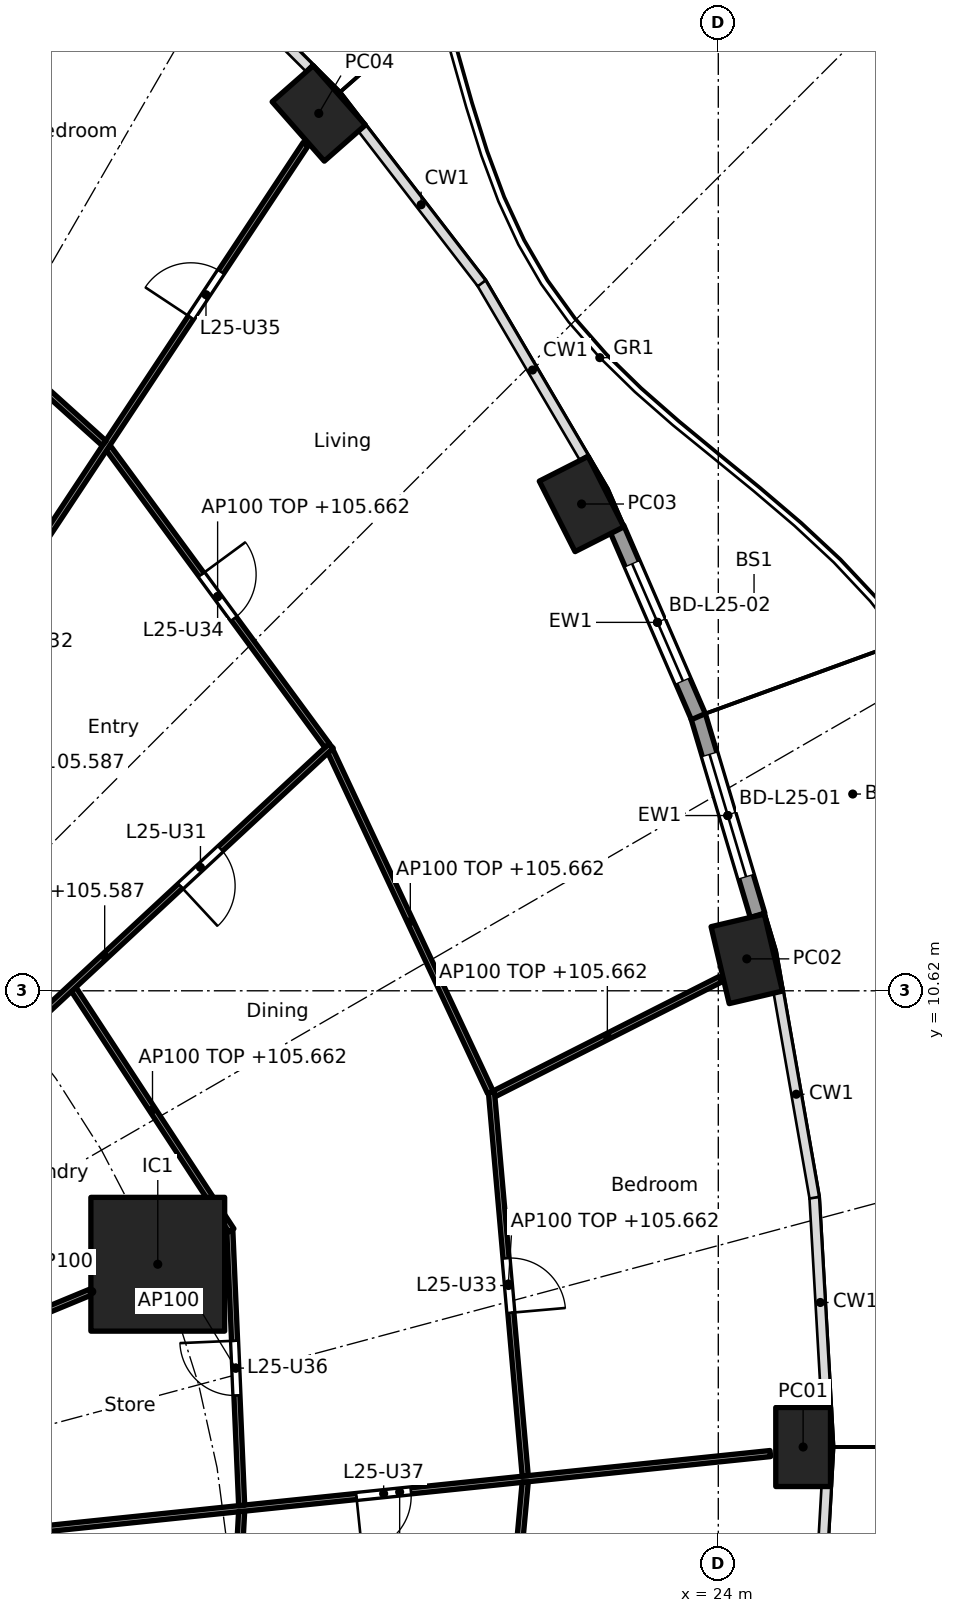
"""IFC4 building model, lengths in metres.
Left out: names, types, materials, properties, quantities, classifications, styles, units other than length and angle.
Written with IfcOpenShell. Run it as: python <this file> out.ifc"""

import sys

from ifc_helpers import new_model, si_unit, direction, frame, frame_2d, origin, origin_2d, place, context, subcontext, project, spatial, rectangle, hollow_rectangle, extrude, element, fill, save


model = new_model("IFC4")
c1 = context("Model", 3, precision=1e-05, world=origin(), true_north=direction((0.0, 1.0)))
c2 = subcontext(c1, "Body", "Model", "MODEL_VIEW")
j1 = project(units=[si_unit("LENGTHUNIT", "METRE"), si_unit("PLANEANGLEUNIT", "RADIAN")], contexts=[c1])
p1 = place(None, origin())
s1 = spatial("IfcSite", under=j1, at=p1, CompositionType="ELEMENT")
p2 = place(p1, origin())
s2 = spatial("IfcBuilding", under=s1, at=p2, CompositionType="ELEMENT")
p3 = place(p2, frame((0.0, 0.0, 102.9)))
s3 = spatial("IfcBuildingStorey", under=s2, at=p3, CompositionType="ELEMENT", Elevation=102.9)
for number, where, z_axis, x_axis in (
    (1, (25.395, 3.118, 0.0), (0.0, 0.0, 1.0), (0.0, 1.0, 0.0)),
    (2, (24.468, 11.145, 0.0), (0.0, 0.0, 1.0), (-0.229, 0.973, 0.0)),
    (3, (21.751, 18.625, 0.0), (0.0, 0.0, 1.0), (-0.452, 0.892, 0.0)),
    (4, (17.43, 25.049, 0.0), (0.0, 0.0, 1.0), (-0.66, 0.751, 0.0)),
):
    element("IfcColumn", number, at=place(p3, frame(where, z_axis=z_axis, x_axis=x_axis)), inside=s3, PredefinedType="COLUMN", context=c2, shape_type="SweptSolid", body=[
        extrude(hollow_rectangle(XDim=1.3, YDim=0.9, WallThickness=0.045, at=origin_2d()), origin(), (0.0, 0.0, 1.0), 3.7),
    ])
p4 = place(p3, frame((14.782, 6.123, 0.0), z_axis=(0.0, 0.0, 1.0), x_axis=(1.0, 0.0, 0.0)))
e5 = element("IfcColumn", 5, at=p4, inside=s3, PredefinedType="COLUMN", context=c2, shape_type="SweptSolid", body=[
    extrude(rectangle(XDim=2.2, YDim=2.2, at=origin_2d()), origin(), (0.0, 0.0, 1.0), 3.7),
])
p5 = place(p3, frame((23.667, 15.142, 0.0), z_axis=(0.0, 0.0, 1.0), x_axis=(0.285882094477, -0.958264800594, 0.0)))
e6 = element("IfcWall", 6, at=p5, inside=s3, PredefinedType="SOLIDWALL", context=c2, shape_type="SweptSolid", body=[
    extrude(rectangle(XDim=3.424, YDim=0.25, at=frame_2d((1.712, 0.0))), origin(), (0.0, 0.0, 1.0), 3.44),
])
p6 = place(p5, frame((0.662, 0.0, 0.0)))
e7 = element("IfcOpeningElement", 7, at=p6, cuts=e6, PredefinedType="OPENING", context=c2, shape_type="SweptSolid", body=[
    extrude(rectangle(XDim=2.1, YDim=2.4, at=frame_2d((1.05, 1.2))), frame((0.0, 0.135, 0.0), z_axis=(0.0, -1.0, 0.0), x_axis=(1.0, 0.0, 0.0)), (0.0, 0.0, 1.0), 0.27),
])
p7 = place(p3, frame((22.328, 18.229, 0.0), z_axis=(0.0, 0.0, 1.0), x_axis=(0.397621629246, -0.917549475481, 0.0)))
e8 = element("IfcWall", 8, at=p7, inside=s3, PredefinedType="SOLIDWALL", context=c2, shape_type="SweptSolid", body=[
    extrude(rectangle(XDim=3.379, YDim=0.25, at=frame_2d((1.69, 0.0))), origin(), (0.0, 0.0, 1.0), 3.44),
])
p8 = place(p7, frame((0.64, 0.0, 0.0)))
e9 = element("IfcOpeningElement", 9, at=p8, cuts=e8, PredefinedType="OPENING", context=c2, shape_type="SweptSolid", body=[
    extrude(rectangle(XDim=2.1, YDim=2.4, at=frame_2d((1.05, 1.2))), frame((0.0, 0.135, 0.0), z_axis=(0.0, -1.0, 0.0), x_axis=(1.0, 0.0, 0.0)), (0.0, 0.0, 1.0), 0.27),
])
p9 = place(p3, frame((12.664, 1.745, 0.0), z_axis=(0.0, 0.0, 1.0), x_axis=(0.994662790212, 0.103179134358, 0.0)))
e10 = element("IfcWall", 10, at=p9, inside=s3, PredefinedType="PARTITIONING", context=c2, shape_type="SweptSolid", body=[
    extrude(rectangle(XDim=12.257, YDim=0.1, at=frame_2d((6.128, 0.0))), origin(), (0.0, 0.0, 1.0), 2.687),
])
p10 = place(p9, frame((5.414, 0.0, 0.0)))
e11 = element("IfcOpeningElement", 11, at=p10, cuts=e10, PredefinedType="OPENING", context=c2, shape_type="SweptSolid", body=[
    extrude(rectangle(XDim=0.9, YDim=2.1, at=frame_2d((0.45, 1.05))), frame((0.0, 0.06, 0.0), z_axis=(0.0, -1.0, 0.0), x_axis=(1.0, 0.0, 0.0)), (0.0, 0.0, 1.0), 0.12),
])
p11 = place(p3, frame((16.162, 2.158, 0.0), z_axis=(0.0, 0.0, 1.0), x_axis=(-0.043120653248, 0.999069872063, 0.0)))
e12 = element("IfcWall", 12, at=p11, inside=s3, PredefinedType="PARTITIONING", context=c2, shape_type="SweptSolid", body=[
    extrude(rectangle(XDim=4.518, YDim=0.1, at=frame_2d((2.259, 0.0))), origin(), (0.0, 0.0, 1.0), 3.44),
])
p12 = place(p11, frame((1.809, 0.0, 0.0)))
e13 = element("IfcOpeningElement", 13, at=p12, cuts=e12, PredefinedType="OPENING", context=c2, shape_type="SweptSolid", body=[
    extrude(rectangle(XDim=0.9, YDim=2.1, at=frame_2d((0.45, 1.05))), frame((0.0, 0.06, 0.0), z_axis=(0.0, -1.0, 0.0), x_axis=(1.0, 0.0, 0.0)), (0.0, 0.0, 1.0), 0.12),
])
p13 = place(p3, frame((16.161, 2.058, 0.0), z_axis=(0.0, 0.0, 1.0), x_axis=(-0.053696394729, -0.998557307916, 0.0)))
e14 = element("IfcWall", 14, at=p13, inside=s3, PredefinedType="PARTITIONING", context=c2, shape_type="SweptSolid", body=[
    extrude(rectangle(XDim=4.742, YDim=0.1, at=frame_2d((2.371, 0.0))), origin(), (0.0, 0.0, 1.0), 2.762),
])
p14 = place(p13, frame((1.896, 0.0, 0.0)))
e15 = element("IfcOpeningElement", 15, at=p14, cuts=e14, PredefinedType="OPENING", context=c2, shape_type="SweptSolid", body=[
    extrude(rectangle(XDim=0.9, YDim=2.1, at=frame_2d((0.45, 1.05))), frame((0.0, 0.06, 0.0), z_axis=(0.0, -1.0, 0.0), x_axis=(1.0, 0.0, 0.0)), (0.0, 0.0, 1.0), 0.12),
])
p15 = place(p3, frame((20.825, 2.642, 0.0), z_axis=(0.0, 0.0, 1.0), x_axis=(-0.08776338161, 0.996141349834, 0.0)))
e16 = element("IfcWall", 16, at=p15, inside=s3, PredefinedType="PARTITIONING", context=c2, shape_type="SweptSolid", body=[
    extrude(rectangle(XDim=6.337, YDim=0.1, at=frame_2d((3.168, 0.0))), origin(), (0.0, 0.0, 1.0), 2.762),
])
p16 = place(p15, frame((2.694, 0.0, 0.0)))
e17 = element("IfcOpeningElement", 17, at=p16, cuts=e16, PredefinedType="OPENING", context=c2, shape_type="SweptSolid", body=[
    extrude(rectangle(XDim=0.9, YDim=2.1, at=frame_2d((0.45, 1.05))), frame((0.0, 0.06, 0.0), z_axis=(0.0, -1.0, 0.0), x_axis=(1.0, 0.0, 0.0)), (0.0, 0.0, 1.0), 0.12),
])
p17 = place(p3, frame((20.825, 2.542, 0.0), z_axis=(0.0, 0.0, 1.0), x_axis=(-0.09140211812, -0.995814065377, 0.0)))
e18 = element("IfcWall", 18, at=p17, inside=s3, PredefinedType="PARTITIONING", context=c2, shape_type="SweptSolid", body=[
    extrude(rectangle(XDim=6.403, YDim=0.1, at=frame_2d((3.201, 0.0))), origin(), (0.0, 0.0, 1.0), 2.762),
])
p18 = place(p17, frame((2.726, 0.0, 0.0)))
e19 = element("IfcOpeningElement", 19, at=p18, cuts=e18, PredefinedType="OPENING", context=c2, shape_type="SweptSolid", body=[
    extrude(rectangle(XDim=0.9, YDim=2.1, at=frame_2d((0.45, 1.05))), frame((0.0, 0.06, 0.0), z_axis=(0.0, -1.0, 0.0), x_axis=(1.0, 0.0, 0.0)), (0.0, 0.0, 1.0), 0.12),
])
p19 = place(p3, frame((12.657, 5.243, 0.0), z_axis=(0.0, 0.0, 1.0), x_axis=(0.923864733477, 0.382719158442, 0.0)))
e20 = element("IfcWall", 20, at=p19, inside=s3, PredefinedType="PARTITIONING", context=c2, shape_type="SweptSolid", body=[
    extrude(rectangle(XDim=2.25, YDim=0.1, at=frame_2d((1.125, 0.0))), origin(), (0.0, 0.0, 1.0), 3.44),
])
p20 = place(p3, frame((15.992, 6.68, 0.0), z_axis=(0.0, 0.0, 1.0), x_axis=(-0.547472878942, 0.836823426311, 0.0)))
e21 = element("IfcWall", 21, at=p20, inside=s3, PredefinedType="PARTITIONING", context=c2, shape_type="SweptSolid", body=[
    extrude(rectangle(XDim=4.738, YDim=0.1, at=frame_2d((2.369, 0.0))), origin(), (0.0, 0.0, 1.0), 2.762),
])
p21 = place(p3, frame((20.318, 8.927, 0.0), z_axis=(0.0, 0.0, 1.0), x_axis=(0.892057836959, 0.451921249246, 0.0)))
e22 = element("IfcWall", 22, at=p21, inside=s3, PredefinedType="PARTITIONING", context=c2, shape_type="SweptSolid", body=[
    extrude(rectangle(XDim=4.164, YDim=0.1, at=frame_2d((2.082, 0.0))), origin(), (0.0, 0.0, 1.0), 2.762),
])
p22 = place(p3, frame((20.252, 8.95, 0.0), z_axis=(0.0, 0.0, 1.0), x_axis=(-0.424580052627, 0.90539040138, 0.0)))
e23 = element("IfcWall", 23, at=p22, inside=s3, PredefinedType="PARTITIONING", context=c2, shape_type="SweptSolid", body=[
    extrude(rectangle(XDim=6.204, YDim=0.1, at=frame_2d((3.102, 0.0))), origin(), (0.0, 0.0, 1.0), 2.762),
])
p23 = place(p3, frame((10.185, 7.726, 0.0), z_axis=(0.0, 0.0, 1.0), x_axis=(0.732598472978, 0.680661059112, 0.0)))
e24 = element("IfcWall", 24, at=p23, inside=s3, PredefinedType="PARTITIONING", context=c2, shape_type="SweptSolid", body=[
    extrude(rectangle(XDim=10.167, YDim=0.1, at=frame_2d((5.084, 0.0))), origin(), (0.0, 0.0, 1.0), 2.687),
])
p24 = place(p23, frame((1.725, 0.0, 0.0)))
e25 = element("IfcOpeningElement", 25, at=p24, cuts=e24, PredefinedType="OPENING", context=c2, shape_type="SweptSolid", body=[
    extrude(rectangle(XDim=0.9, YDim=2.1, at=frame_2d((0.45, 1.05))), frame((0.0, 0.06, 0.0), z_axis=(0.0, -1.0, 0.0), x_axis=(1.0, 0.0, 0.0)), (0.0, 0.0, 1.0), 0.12),
])
p25 = place(p23, frame((6.784, 0.0, 0.0)))
e26 = element("IfcOpeningElement", 26, at=p25, cuts=e24, PredefinedType="OPENING", context=c2, shape_type="SweptSolid", body=[
    extrude(rectangle(XDim=0.9, YDim=2.1, at=frame_2d((0.45, 1.05))), frame((0.0, 0.06, 0.0), z_axis=(0.0, -1.0, 0.0), x_axis=(1.0, 0.0, 0.0)), (0.0, 0.0, 1.0), 0.12),
])
p26 = place(p3, frame((17.567, 14.653, 0.0), z_axis=(0.0, 0.0, 1.0), x_axis=(-0.592391983588, 0.80564988536, 0.0)))
e27 = element("IfcWall", 27, at=p26, inside=s3, PredefinedType="PARTITIONING", context=c2, shape_type="SweptSolid", body=[
    extrude(rectangle(XDim=6.08, YDim=0.1, at=frame_2d((3.04, 0.0))), origin(), (0.0, 0.0, 1.0), 2.762),
])
p27 = place(p26, frame((2.59, 0.0, 0.0)))
e28 = element("IfcOpeningElement", 28, at=p27, cuts=e27, PredefinedType="OPENING", context=c2, shape_type="SweptSolid", body=[
    extrude(rectangle(XDim=0.9, YDim=2.1, at=frame_2d((0.45, 1.05))), frame((0.0, 0.06, 0.0), z_axis=(0.0, -1.0, 0.0), x_axis=(1.0, 0.0, 0.0)), (0.0, 0.0, 1.0), 0.12),
])
p28 = place(p3, frame((7.713, 10.195, 0.0), z_axis=(0.0, 0.0, 1.0), x_axis=(0.552111071171, 0.833770571015, 0.0)))
e29 = element("IfcWall", 29, at=p28, inside=s3, PredefinedType="PARTITIONING", context=c2, shape_type="SweptSolid", body=[
    extrude(rectangle(XDim=17.208, YDim=0.1, at=frame_2d((8.604, 0.0))), origin(), (0.0, 0.0, 1.0), 2.687),
])
p29 = place(p28, frame((1.976, 0.0, 0.0)))
e30 = element("IfcOpeningElement", 30, at=p29, cuts=e29, PredefinedType="OPENING", context=c2, shape_type="SweptSolid", body=[
    extrude(rectangle(XDim=0.9, YDim=2.1, at=frame_2d((0.45, 1.05))), frame((0.0, 0.06, 0.0), z_axis=(0.0, -1.0, 0.0), x_axis=(1.0, 0.0, 0.0)), (0.0, 0.0, 1.0), 0.12),
])
p30 = place(p28, frame((7.611, 0.0, 0.0)))
e31 = element("IfcOpeningElement", 31, at=p30, cuts=e29, PredefinedType="OPENING", context=c2, shape_type="SweptSolid", body=[
    extrude(rectangle(XDim=0.9, YDim=2.1, at=frame_2d((0.45, 1.05))), frame((0.0, 0.06, 0.0), z_axis=(0.0, -1.0, 0.0), x_axis=(1.0, 0.0, 0.0)), (0.0, 0.0, 1.0), 0.12),
])
p31 = place(p28, frame((13.79, 0.0, 0.0)))
e32 = element("IfcOpeningElement", 32, at=p31, cuts=e29, PredefinedType="OPENING", context=c2, shape_type="SweptSolid", body=[
    extrude(rectangle(XDim=0.9, YDim=2.1, at=frame_2d((0.45, 1.05))), frame((0.0, 0.06, 0.0), z_axis=(0.0, -1.0, 0.0), x_axis=(1.0, 0.0, 0.0)), (0.0, 0.0, 1.0), 0.12),
])
p32 = place(p3, frame((13.898, 19.625, 0.0), z_axis=(0.0, 0.0, 1.0), x_axis=(-0.742396654702, 0.669960601146, 0.0)))
e33 = element("IfcWall", 33, at=p32, inside=s3, PredefinedType="PARTITIONING", context=c2, shape_type="SweptSolid", body=[
    extrude(rectangle(XDim=5.861, YDim=0.1, at=frame_2d((2.931, 0.0))), origin(), (0.0, 0.0, 1.0), 2.762),
])
p33 = place(p32, frame((3.958, 0.0, 0.0)))
e34 = element("IfcOpeningElement", 34, at=p33, cuts=e33, PredefinedType="OPENING", context=c2, shape_type="SweptSolid", body=[
    extrude(rectangle(XDim=0.9, YDim=2.1, at=frame_2d((0.45, 1.05))), frame((0.0, 0.06, 0.0), z_axis=(0.0, -1.0, 0.0), x_axis=(1.0, 0.0, 0.0)), (0.0, 0.0, 1.0), 0.12),
])
p34 = place(p6, origin())
e35 = element("IfcDoor", 35, at=p34, inside=s3, OperationType="SLIDING_TO_LEFT", PredefinedType="DOOR", context=c2, shape_type="SweptSolid", body=[
    extrude(rectangle(XDim=2.1, YDim=2.4, at=frame_2d((1.05, 1.2))), frame((0.0, 0.025, 0.0), z_axis=(0.0, -1.0, 0.0), x_axis=(1.0, 0.0, 0.0)), (0.0, 0.0, 1.0), 0.05),
])
fill(e7, e35)
p35 = place(p8, origin())
e36 = element("IfcDoor", 36, at=p35, inside=s3, OperationType="SLIDING_TO_LEFT", PredefinedType="DOOR", context=c2, shape_type="SweptSolid", body=[
    extrude(rectangle(XDim=2.1, YDim=2.4, at=frame_2d((1.05, 1.2))), frame((0.0, 0.025, 0.0), z_axis=(0.0, -1.0, 0.0), x_axis=(1.0, 0.0, 0.0)), (0.0, 0.0, 1.0), 0.05),
])
fill(e9, e36)
p36 = place(p25, frame((0.9, 0.0, 0.0), x_axis=(-1.0, 0.0, 0.0)))
e37 = element("IfcDoor", 37, at=p36, inside=s3, OperationType="SINGLE_SWING_RIGHT", PredefinedType="DOOR", context=c2, shape_type="SweptSolid", body=[
    extrude(rectangle(XDim=0.9, YDim=2.1, at=frame_2d((0.45, 1.05))), frame((0.0, 0.025, 0.0), z_axis=(0.0, -1.0, 0.0), x_axis=(1.0, 0.0, 0.0)), (0.0, 0.0, 1.0), 0.05),
])
fill(e26, e37)
p37 = place(p16, frame((0.9, 0.0, 0.0), x_axis=(-1.0, 0.0, 0.0)))
e38 = element("IfcDoor", 38, at=p37, inside=s3, OperationType="SINGLE_SWING_RIGHT", PredefinedType="DOOR", context=c2, shape_type="SweptSolid", body=[
    extrude(rectangle(XDim=0.9, YDim=2.1, at=frame_2d((0.45, 1.05))), frame((0.0, 0.025, 0.0), z_axis=(0.0, -1.0, 0.0), x_axis=(1.0, 0.0, 0.0)), (0.0, 0.0, 1.0), 0.05),
])
fill(e17, e38)
p38 = place(p27, frame((0.9, 0.0, 0.0), x_axis=(-1.0, 0.0, 0.0)))
e39 = element("IfcDoor", 39, at=p38, inside=s3, OperationType="SINGLE_SWING_LEFT", PredefinedType="DOOR", context=c2, shape_type="SweptSolid", body=[
    extrude(rectangle(XDim=0.9, YDim=2.1, at=frame_2d((0.45, 1.05))), frame((0.0, 0.025, 0.0), z_axis=(0.0, -1.0, 0.0), x_axis=(1.0, 0.0, 0.0)), (0.0, 0.0, 1.0), 0.05),
])
fill(e28, e39)
p39 = place(p31, origin())
e40 = element("IfcDoor", 40, at=p39, inside=s3, OperationType="SINGLE_SWING_LEFT", PredefinedType="DOOR", context=c2, shape_type="SweptSolid", body=[
    extrude(rectangle(XDim=0.9, YDim=2.1, at=frame_2d((0.45, 1.05))), frame((0.0, 0.025, 0.0), z_axis=(0.0, -1.0, 0.0), x_axis=(1.0, 0.0, 0.0)), (0.0, 0.0, 1.0), 0.05),
])
fill(e32, e40)
p40 = place(p12, origin())
e41 = element("IfcDoor", 41, at=p40, inside=s3, OperationType="SINGLE_SWING_RIGHT", PredefinedType="DOOR", context=c2, shape_type="SweptSolid", body=[
    extrude(rectangle(XDim=0.9, YDim=2.1, at=frame_2d((0.45, 1.05))), frame((0.0, 0.025, 0.0), z_axis=(0.0, -1.0, 0.0), x_axis=(1.0, 0.0, 0.0)), (0.0, 0.0, 1.0), 0.05),
])
fill(e13, e41)
p41 = place(p10, frame((0.9, 0.0, 0.0), x_axis=(-1.0, 0.0, 0.0)))
e42 = element("IfcDoor", 42, at=p41, inside=s3, OperationType="SINGLE_SWING_RIGHT", PredefinedType="DOOR", context=c2, shape_type="SweptSolid", body=[
    extrude(rectangle(XDim=0.9, YDim=2.1, at=frame_2d((0.45, 1.05))), frame((0.0, 0.025, 0.0), z_axis=(0.0, -1.0, 0.0), x_axis=(1.0, 0.0, 0.0)), (0.0, 0.0, 1.0), 0.05),
])
fill(e11, e42)
save(model, sys.argv[1])
